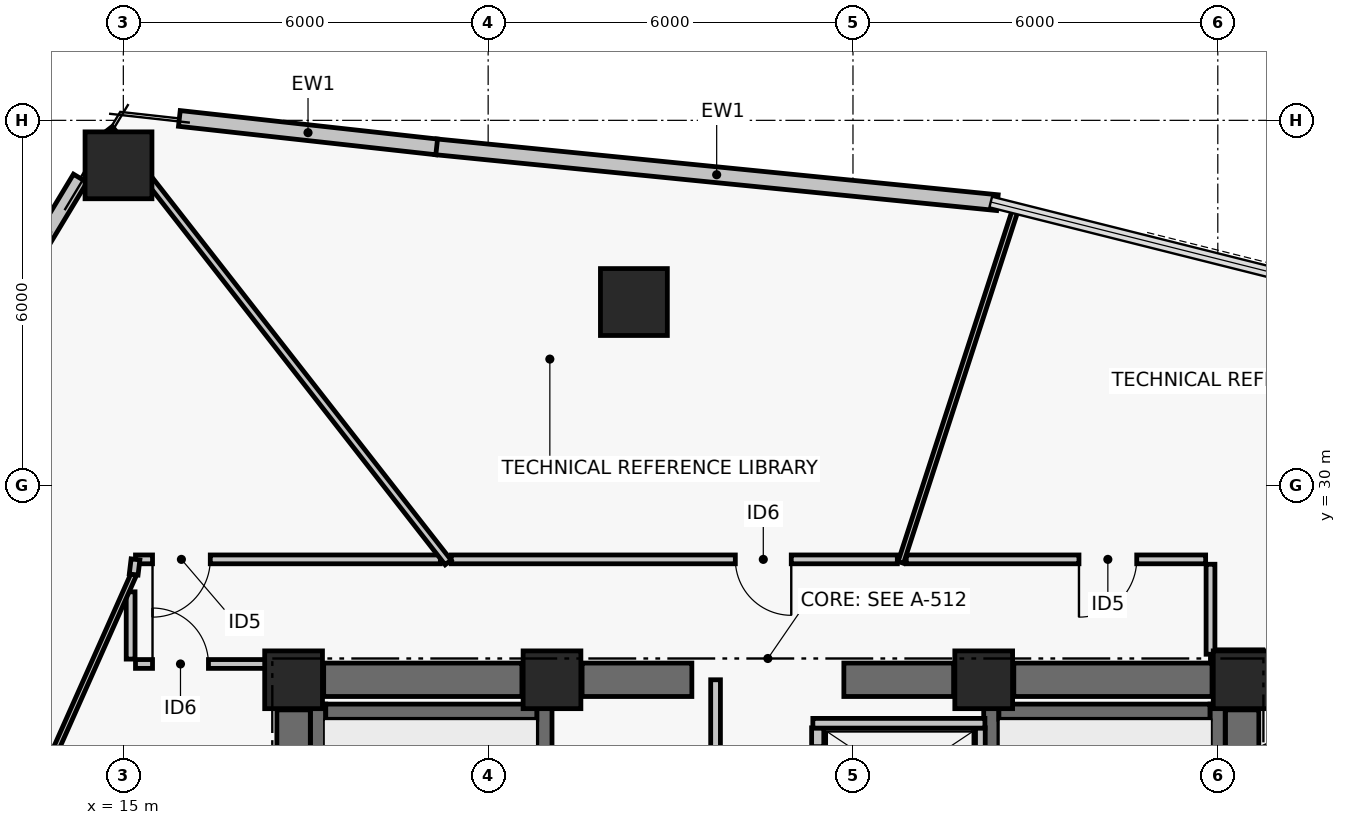
"""IFC4 building model, lengths in metres.
Left out: names, types, materials, properties, quantities, classifications, styles, units other than length and angle.
Written with IfcOpenShell. Run it as: python <this file> out.ifc"""

import sys

from ifc_helpers import new_model, si_unit, direction, frame, frame_2d, origin, origin_2d, place, context, subcontext, project, spatial, rectangle, hollow_rectangle, extrude, element, fill, save


model = new_model("IFC4")
c1 = context("Model", 3, precision=1e-05, world=origin(), true_north=direction((0.0, 1.0)))
c2 = subcontext(c1, "Body", "Model", "MODEL_VIEW")
j1 = project(units=[si_unit("LENGTHUNIT", "METRE"), si_unit("PLANEANGLEUNIT", "RADIAN")], contexts=[c1])
p1 = place(None, origin())
s1 = spatial("IfcSite", under=j1, at=p1, CompositionType="ELEMENT")
p2 = place(p1, origin())
s2 = spatial("IfcBuilding", under=s1, at=p2, CompositionType="ELEMENT")
p3 = place(p2, frame((0.0, 0.0, 165.48)))
s3 = spatial("IfcBuildingStorey", under=s2, at=p3, CompositionType="ELEMENT", Elevation=165.48)
for number, where, z_axis, x_axis in (
    (1, (17.8, 26.8, 0.0), (0.0, 0.0, 1.0), (1.0, 0.0, 0.0)),
    (2, (22.05, 26.8, 0.0), (0.0, 0.0, 1.0), (1.0, 0.0, 0.0)),
    (3, (29.15, 26.8, 0.0), (0.0, 0.0, 1.0), (1.0, 0.0, 0.0)),
    (4, (33.4, 26.8, 0.0), (0.0, 0.0, 1.0), (1.0, 0.0, 0.0)),
):
    element("IfcColumn", number, at=place(p3, frame(where, z_axis=z_axis, x_axis=x_axis)), inside=s3, PredefinedType="COLUMN", context=c2, shape_type="SweptSolid", body=[
        extrude(rectangle(XDim=0.95, YDim=0.95, at=origin_2d()), origin(), (0.0, 0.0, 1.0), 3.72),
    ])
p4 = place(p3, frame((18.295, 26.8, 0.0), z_axis=(0.0, 0.0, 1.0), x_axis=(1.0, 0.0, 0.0)))
e5 = element("IfcWall", 5, at=p4, inside=s3, PredefinedType="SHEAR", context=c2, shape_type="SweptSolid", body=[
    extrude(rectangle(XDim=3.26, YDim=0.55, at=frame_2d((1.63, 0.0))), origin(), (0.0, 0.0, 1.0), 3.5),
])
p5 = place(p3, frame((22.545, 26.8, 0.0), z_axis=(0.0, 0.0, 1.0), x_axis=(1.0, 0.0, 0.0)))
e6 = element("IfcWall", 6, at=p5, inside=s3, PredefinedType="SHEAR", context=c2, shape_type="SweptSolid", body=[
    extrude(rectangle(XDim=1.805, YDim=0.55, at=frame_2d((0.903, 0.0))), origin(), (0.0, 0.0, 1.0), 3.5),
])
p6 = place(p3, frame((26.85, 26.8, 0.0), z_axis=(0.0, 0.0, 1.0), x_axis=(1.0, 0.0, 0.0)))
e7 = element("IfcWall", 7, at=p6, inside=s3, PredefinedType="SHEAR", context=c2, shape_type="SweptSolid", body=[
    extrude(rectangle(XDim=1.805, YDim=0.55, at=frame_2d((0.902, 0.0))), origin(), (0.0, 0.0, 1.0), 3.5),
])
p7 = place(p3, frame((29.645, 26.8, 0.0), z_axis=(0.0, 0.0, 1.0), x_axis=(1.0, 0.0, 0.0)))
e8 = element("IfcWall", 8, at=p7, inside=s3, PredefinedType="SHEAR", context=c2, shape_type="SweptSolid", body=[
    extrude(rectangle(XDim=3.26, YDim=0.55, at=frame_2d((1.63, 0.0))), origin(), (0.0, 0.0, 1.0), 3.5),
])
for number, where, z_axis, x_axis in (
    (9, (17.8, 17.695, 0.0), (0.0, 0.0, 1.0), (0.0, 1.0, 0.0)),
    (10, (33.4, 17.695, 0.0), (0.0, 0.0, 1.0), (0.0, 1.0, 0.0)),
):
    element("IfcWall", number, at=place(p3, frame(where, z_axis=z_axis, x_axis=x_axis)), inside=s3, PredefinedType="SHEAR", context=c2, shape_type="SweptSolid", body=[
        extrude(rectangle(XDim=8.61, YDim=0.55, at=frame_2d((4.305, 0.0))), origin(), (0.0, 0.0, 1.0), 3.5),
    ])
p8 = place(p3, frame((18.204, 17.6, 0.0), z_axis=(0.0, 0.0, 1.0), x_axis=(0.0, 1.0, 0.0)))
e11 = element("IfcWall", 11, at=p8, inside=s3, PredefinedType="SHEAR", context=c2, shape_type="SweptSolid", body=[
    extrude(rectangle(XDim=8.8, YDim=0.25, at=frame_2d((4.4, 0.0))), origin(), (0.0, 0.0, 1.0), 3.5),
])
p9 = place(p3, frame((21.925, 17.6, 0.0), z_axis=(0.0, 0.0, 1.0), x_axis=(0.0, 1.0, 0.0)))
e12 = element("IfcWall", 12, at=p9, inside=s3, PredefinedType="SHEAR", context=c2, shape_type="SweptSolid", body=[
    extrude(rectangle(XDim=8.8, YDim=0.25, at=frame_2d((4.4, 0.0))), origin(), (0.0, 0.0, 1.0), 3.5),
])
p10 = place(p9, frame((0.35, 0.0, 0.0)))
e13 = element("IfcOpeningElement", 13, at=p10, cuts=e12, PredefinedType="OPENING", context=c2, shape_type="SweptSolid", body=[
    extrude(rectangle(XDim=1.05, YDim=2.08, at=frame_2d((0.525, 1.04))), frame((0.0, 0.135, 0.0), z_axis=(0.0, -1.0, 0.0), x_axis=(1.0, 0.0, 0.0)), (0.0, 0.0, 1.0), 0.27),
])
p11 = place(p3, frame((18.329, 26.275, 0.0), z_axis=(0.0, 0.0, 1.0), x_axis=(1.0, 0.0, 0.0)))
e14 = element("IfcWall", 14, at=p11, inside=s3, PredefinedType="SHEAR", context=c2, shape_type="SweptSolid", body=[
    extrude(rectangle(XDim=3.471, YDim=0.25, at=frame_2d((1.735, 0.0))), origin(), (0.0, 0.0, 1.0), 3.5),
])
p12 = place(p3, frame((29.275, 17.6, 0.0), z_axis=(0.0, 0.0, 1.0), x_axis=(0.0, 1.0, 0.0)))
e15 = element("IfcWall", 15, at=p12, inside=s3, PredefinedType="SHEAR", context=c2, shape_type="SweptSolid", body=[
    extrude(rectangle(XDim=8.8, YDim=0.25, at=frame_2d((4.4, 0.0))), origin(), (0.0, 0.0, 1.0), 3.5),
])
p13 = place(p12, frame((0.35, 0.0, 0.0)))
e16 = element("IfcOpeningElement", 16, at=p13, cuts=e15, PredefinedType="OPENING", context=c2, shape_type="SweptSolid", body=[
    extrude(rectangle(XDim=1.05, YDim=2.08, at=frame_2d((0.525, 1.04))), frame((0.0, 0.135, 0.0), z_axis=(0.0, -1.0, 0.0), x_axis=(1.0, 0.0, 0.0)), (0.0, 0.0, 1.0), 0.27),
])
p14 = place(p3, frame((32.996, 17.6, 0.0), z_axis=(0.0, 0.0, 1.0), x_axis=(0.0, 1.0, 0.0)))
e17 = element("IfcWall", 17, at=p14, inside=s3, PredefinedType="SHEAR", context=c2, shape_type="SweptSolid", body=[
    extrude(rectangle(XDim=8.8, YDim=0.25, at=frame_2d((4.4, 0.0))), origin(), (0.0, 0.0, 1.0), 3.5),
])
p15 = place(p3, frame((29.4, 26.275, 0.0), z_axis=(0.0, 0.0, 1.0), x_axis=(1.0, 0.0, 0.0)))
e18 = element("IfcWall", 18, at=p15, inside=s3, PredefinedType="SHEAR", context=c2, shape_type="SweptSolid", body=[
    extrude(rectangle(XDim=3.471, YDim=0.25, at=frame_2d((1.736, 0.0))), origin(), (0.0, 0.0, 1.0), 3.5),
])
for number, where, z_axis, x_axis in (
    (19, (23.397, 33.012, 0.0), (0.0, 0.0, 1.0), (1.0, 0.0, 0.0)),
    (20, (14.92, 35.26, 0.0), (0.0, 0.0, 1.0), (1.0, 0.0, 0.0)),
):
    element("IfcColumn", number, at=place(p3, frame(where, z_axis=z_axis, x_axis=x_axis)), inside=s3, PredefinedType="COLUMN", context=c2, shape_type="SweptSolid", body=[
        extrude(hollow_rectangle(XDim=1.1, YDim=1.1, WallThickness=0.045, at=origin_2d()), origin(), (0.0, 0.0, 1.0), 3.72),
    ])
p16 = place(p3, frame((20.141, 35.565, 0.0), z_axis=(0.0, 0.0, 1.0), x_axis=(0.9950896707, -0.098977508888, 0.0)))
e21 = element("IfcWall", 21, at=p16, inside=s3, PredefinedType="PARTITIONING", context=c2, shape_type="SweptSolid", body=[
    extrude(rectangle(XDim=9.28, YDim=0.26, at=frame_2d((4.64, 0.0))), origin(), (0.0, 0.0, 1.0), 3.5),
])
p17 = place(p3, frame((15.921, 36.031, 0.0), z_axis=(0.0, 0.0, 1.0), x_axis=(0.993933978819, -0.109978387641, 0.0)))
e22 = element("IfcWall", 22, at=p17, inside=s3, PredefinedType="PARTITIONING", context=c2, shape_type="SweptSolid", body=[
    extrude(rectangle(XDim=4.258, YDim=0.26, at=frame_2d((2.129, 0.0))), origin(), (0.0, 0.0, 1.0), 3.5),
])
p18 = place(p3, frame((13.221, 33.272, 0.0), z_axis=(0.0, 0.0, 1.0), x_axis=(0.516157331647, 0.856493788061, 0.0)))
e23 = element("IfcWall", 23, at=p18, inside=s3, PredefinedType="PARTITIONING", context=c2, shape_type="SweptSolid", body=[
    extrude(rectangle(XDim=2.073, YDim=0.26, at=frame_2d((1.037, 0.0))), origin(), (0.0, 0.0, 1.0), 3.5),
])
p19 = place(p3, frame((26.42, 24.29, 0.0), z_axis=(0.0, 0.0, 1.0), x_axis=(0.0, 1.0, 0.0)))
e24 = element("IfcWall", 24, at=p19, inside=s3, PredefinedType="PARTITIONING", context=c2, shape_type="SweptSolid", body=[
    extrude(rectangle(XDim=1.72, YDim=0.2, at=frame_2d((0.86, 0.0))), origin(), (0.0, 0.0, 1.0), 3.5),
])
p20 = place(p19, frame((0.31, 0.0, 0.0)))
e25 = element("IfcOpeningElement", 25, at=p20, cuts=e24, PredefinedType="OPENING", context=c2, shape_type="SweptSolid", body=[
    extrude(rectangle(XDim=1.1, YDim=2.08, at=frame_2d((0.55, 1.04))), frame((0.0, 0.11, 0.0), z_axis=(0.0, -1.0, 0.0), x_axis=(1.0, 0.0, 0.0)), (0.0, 0.0, 1.0), 0.22),
])
p21 = place(p3, frame((29.095, 20.56, 0.0), z_axis=(0.0, 0.0, 1.0), x_axis=(0.0, 1.0, 0.0)))
e26 = element("IfcWall", 26, at=p21, inside=s3, PredefinedType="PARTITIONING", context=c2, shape_type="SweptSolid", body=[
    extrude(rectangle(XDim=5.45, YDim=0.16, at=frame_2d((2.725, 0.0))), origin(), (0.0, 0.0, 1.0), 3.5),
])
p22 = place(p3, frame((26.34, 26.085, 0.0), z_axis=(0.0, 0.0, 1.0), x_axis=(1.0, 0.0, 0.0)))
e27 = element("IfcWall", 27, at=p22, inside=s3, PredefinedType="PARTITIONING", context=c2, shape_type="SweptSolid", body=[
    extrude(rectangle(XDim=2.83, YDim=0.16, at=frame_2d((1.415, 0.0))), origin(), (0.0, 0.0, 1.0), 3.5),
])
p23 = place(p3, frame((24.74, 22.43, 0.0), z_axis=(0.0, 0.0, 1.0), x_axis=(0.0, 1.0, 0.0)))
e28 = element("IfcWall", 28, at=p23, inside=s3, PredefinedType="PARTITIONING", context=c2, shape_type="SweptSolid", body=[
    extrude(rectangle(XDim=4.37, YDim=0.16, at=frame_2d((2.185, 0.0))), origin(), (0.0, 0.0, 1.0), 2.63),
])
p24 = place(p23, frame((1.4, 0.0, 0.0)))
e29 = element("IfcOpeningElement", 29, at=p24, cuts=e28, PredefinedType="OPENING", context=c2, shape_type="SweptSolid", body=[
    extrude(rectangle(XDim=0.98, YDim=2.06, at=frame_2d((0.49, 1.03))), frame((0.0, 0.09, 0.0), z_axis=(0.0, -1.0, 0.0), x_axis=(1.0, 0.0, 0.0)), (0.0, 0.0, 1.0), 0.18),
])
p25 = place(p3, frame((33.74, 27.22, 0.0), z_axis=(0.0, 0.0, 1.0), x_axis=(-1.0, 0.0, 0.0)))
e30 = element("IfcWall", 30, at=p25, inside=s3, PredefinedType="PARTITIONING", context=c2, shape_type="SweptSolid", body=[
    extrude(rectangle(XDim=0.86, YDim=0.145, at=frame_2d((0.43, 0.0))), origin(), (0.0, 0.0, 1.0), 2.63),
])
p26 = place(p3, frame((32.88, 27.22, 0.0), z_axis=(0.0, 0.0, 1.0), x_axis=(0.0, 1.0, 0.0)))
e31 = element("IfcWall", 31, at=p26, inside=s3, PredefinedType="PARTITIONING", context=c2, shape_type="SweptSolid", body=[
    extrude(rectangle(XDim=1.48, YDim=0.145, at=frame_2d((0.74, 0.0))), origin(), (0.0, 0.0, 1.0), 2.63),
])
p27 = place(p3, frame((32.8, 28.78, 0.0), z_axis=(0.0, 0.0, 1.0), x_axis=(-1.0, 0.0, 0.0)))
e32 = element("IfcWall", 32, at=p27, inside=s3, PredefinedType="PARTITIONING", context=c2, shape_type="SweptSolid", body=[
    extrude(rectangle(XDim=4.923, YDim=0.145, at=frame_2d((2.462, 0.0))), origin(), (0.0, 0.0, 1.0), 2.93),
])
p28 = place(p27, frame((1.133, 0.0, 0.0)))
e33 = element("IfcOpeningElement", 33, at=p28, cuts=e32, PredefinedType="OPENING", context=c2, shape_type="SweptSolid", body=[
    extrude(rectangle(XDim=0.95, YDim=2.06, at=frame_2d((0.475, 1.03))), frame((0.0, 0.083, 0.0), z_axis=(0.0, -1.0, 0.0), x_axis=(1.0, 0.0, 0.0)), (0.0, 0.0, 1.0), 0.165),
])
p29 = place(p3, frame((27.729, 28.78, 0.0), z_axis=(0.0, 0.0, 1.0), x_axis=(-1.0, 0.0, 0.0)))
e34 = element("IfcWall", 34, at=p29, inside=s3, PredefinedType="PARTITIONING", context=c2, shape_type="SweptSolid", body=[
    extrude(rectangle(XDim=7.338, YDim=0.145, at=frame_2d((3.669, 0.0))), origin(), (0.0, 0.0, 1.0), 2.73),
])
p30 = place(p29, frame((1.744, 0.0, 0.0)))
e35 = element("IfcOpeningElement", 35, at=p30, cuts=e34, PredefinedType="OPENING", context=c2, shape_type="SweptSolid", body=[
    extrude(rectangle(XDim=0.92, YDim=2.05, at=frame_2d((0.46, 1.025))), frame((0.0, 0.083, 0.0), z_axis=(0.0, -1.0, 0.0), x_axis=(1.0, 0.0, 0.0)), (0.0, 0.0, 1.0), 0.165),
])
p31 = place(p3, frame((20.214, 28.78, 0.0), z_axis=(0.0, 0.0, 1.0), x_axis=(-1.0, 0.0, 0.0)))
e36 = element("IfcWall", 36, at=p31, inside=s3, PredefinedType="PARTITIONING", context=c2, shape_type="SweptSolid", body=[
    extrude(rectangle(XDim=5.014, YDim=0.145, at=frame_2d((2.507, 0.0))), origin(), (0.0, 0.0, 1.0), 2.73),
])
p32 = place(p31, frame((3.784, 0.0, 0.0)))
e37 = element("IfcOpeningElement", 37, at=p32, cuts=e36, PredefinedType="OPENING", context=c2, shape_type="SweptSolid", body=[
    extrude(rectangle(XDim=0.95, YDim=2.06, at=frame_2d((0.475, 1.03))), frame((0.0, 0.083, 0.0), z_axis=(0.0, -1.0, 0.0), x_axis=(1.0, 0.0, 0.0)), (0.0, 0.0, 1.0), 0.165),
])
p33 = place(p3, frame((15.2, 27.06, 0.0), z_axis=(0.0, 0.0, 1.0), x_axis=(1.0, 0.0, 0.0)))
e38 = element("IfcWall", 38, at=p33, inside=s3, PredefinedType="PARTITIONING", context=c2, shape_type="SweptSolid", body=[
    extrude(rectangle(XDim=2.18, YDim=0.145, at=frame_2d((1.09, 0.0))), origin(), (0.0, 0.0, 1.0), 2.73),
])
p34 = place(p33, frame((0.28, 0.0, 0.0)))
e39 = element("IfcOpeningElement", 39, at=p34, cuts=e38, PredefinedType="OPENING", context=c2, shape_type="SweptSolid", body=[
    extrude(rectangle(XDim=0.92, YDim=2.05, at=frame_2d((0.46, 1.025))), frame((0.0, 0.083, 0.0), z_axis=(0.0, -1.0, 0.0), x_axis=(1.0, 0.0, 0.0)), (0.0, 0.0, 1.0), 0.165),
])
p35 = place(p3, frame((15.12, 28.247, 0.0), z_axis=(0.0, 0.0, 1.0), x_axis=(0.0, -1.0, 0.0)))
e40 = element("IfcWall", 40, at=p35, inside=s3, PredefinedType="PARTITIONING", context=c2, shape_type="SweptSolid", body=[
    extrude(rectangle(XDim=1.107, YDim=0.145, at=frame_2d((0.553, 0.0))), origin(), (0.0, 0.0, 1.0), 2.73),
])
p36 = place(p3, frame((33.77, 25.637, 0.0), z_axis=(0.0, 0.0, 1.0), x_axis=(0.913542006179, 0.406744395102, 0.0)))
e41 = element("IfcWall", 41, at=p36, inside=s3, PredefinedType="PARTITIONING", context=c2, shape_type="SweptSolid", body=[
    extrude(rectangle(XDim=10.915, YDim=0.125, at=frame_2d((5.457, 0.0))), origin(), (0.0, 0.0, 1.0), 2.63),
])
p37 = place(p36, frame((6.177, 0.0, 0.0)))
e42 = element("IfcOpeningElement", 42, at=p37, cuts=e41, PredefinedType="OPENING", context=c2, shape_type="SweptSolid", body=[
    extrude(rectangle(XDim=0.92, YDim=2.05, at=frame_2d((0.46, 1.025))), frame((0.0, 0.073, 0.0), z_axis=(0.0, -1.0, 0.0), x_axis=(1.0, 0.0, 0.0)), (0.0, 0.0, 1.0), 0.145),
])
p38 = place(p3, frame((27.787, 28.73, 0.0), z_axis=(0.0, 0.0, 1.0), x_axis=(0.309017664707, 0.951056298491, 0.0)))
e43 = element("IfcWall", 43, at=p38, inside=s3, PredefinedType="PARTITIONING", context=c2, shape_type="SweptSolid", body=[
    extrude(rectangle(XDim=6.133, YDim=0.095, at=frame_2d((3.067, 0.0))), origin(), (0.0, 0.0, 1.0), 2.93),
])
p39 = place(p3, frame((20.342, 28.73, 0.0), z_axis=(0.0, 0.0, 1.0), x_axis=(-0.615659223334, 0.78801251305, 0.0)))
e44 = element("IfcWall", 44, at=p39, inside=s3, PredefinedType="PARTITIONING", context=c2, shape_type="SweptSolid", body=[
    extrude(rectangle(XDim=9.05, YDim=0.125, at=frame_2d((4.525, 0.0))), origin(), (0.0, 0.0, 1.0), 2.93),
])
p40 = place(p3, frame((15.17, 28.531, 0.0), z_axis=(0.0, 0.0, 1.0), x_axis=(-0.406717829794, -0.913553833623, 0.0)))
e45 = element("IfcWall", 45, at=p40, inside=s3, PredefinedType="PARTITIONING", context=c2, shape_type="SweptSolid", body=[
    extrude(rectangle(XDim=8.718, YDim=0.095, at=frame_2d((4.359, 0.0))), origin(), (0.0, 0.0, 1.0), 2.73),
])
p41 = place(p3, frame((15.2, 28.78, 0.0), z_axis=(0.0, 0.0, 1.0), x_axis=(-0.119720914767, -0.992807585873, 0.0)))
e46 = element("IfcWall", 46, at=p41, inside=s3, PredefinedType="PARTITIONING", context=c2, shape_type="SweptSolid", body=[
    extrude(rectangle(XDim=0.251, YDim=0.145, at=frame_2d((0.125, 0.0))), origin(), (0.0, 0.0, 1.0), 3.5),
])
p42 = place(p28, origin())
e47 = element("IfcDoor", 47, at=p42, inside=s3, OperationType="SINGLE_SWING_RIGHT", PredefinedType="DOOR", context=c2, shape_type="SweptSolid", body=[
    extrude(rectangle(XDim=0.95, YDim=2.06, at=frame_2d((0.475, 1.03))), frame((0.0, 0.025, 0.0), z_axis=(0.0, -1.0, 0.0), x_axis=(1.0, 0.0, 0.0)), (0.0, 0.0, 1.0), 0.05),
])
fill(e33, e47)
p43 = place(p30, origin())
e48 = element("IfcDoor", 48, at=p43, inside=s3, OperationType="SINGLE_SWING_LEFT", PredefinedType="DOOR", context=c2, shape_type="SweptSolid", body=[
    extrude(rectangle(XDim=0.92, YDim=2.05, at=frame_2d((0.46, 1.025))), frame((0.0, 0.025, 0.0), z_axis=(0.0, -1.0, 0.0), x_axis=(1.0, 0.0, 0.0)), (0.0, 0.0, 1.0), 0.05),
])
fill(e35, e48)
p44 = place(p32, origin())
e49 = element("IfcDoor", 49, at=p44, inside=s3, OperationType="SINGLE_SWING_RIGHT", PredefinedType="DOOR", context=c2, shape_type="SweptSolid", body=[
    extrude(rectangle(XDim=0.95, YDim=2.06, at=frame_2d((0.475, 1.03))), frame((0.0, 0.025, 0.0), z_axis=(0.0, -1.0, 0.0), x_axis=(1.0, 0.0, 0.0)), (0.0, 0.0, 1.0), 0.05),
])
fill(e37, e49)
p45 = place(p34, origin())
e50 = element("IfcDoor", 50, at=p45, inside=s3, OperationType="SINGLE_SWING_LEFT", PredefinedType="DOOR", context=c2, shape_type="SweptSolid", body=[
    extrude(rectangle(XDim=0.92, YDim=2.05, at=frame_2d((0.46, 1.025))), frame((0.0, 0.025, 0.0), z_axis=(0.0, -1.0, 0.0), x_axis=(1.0, 0.0, 0.0)), (0.0, 0.0, 1.0), 0.05),
])
fill(e39, e50)
save(model, sys.argv[1])
